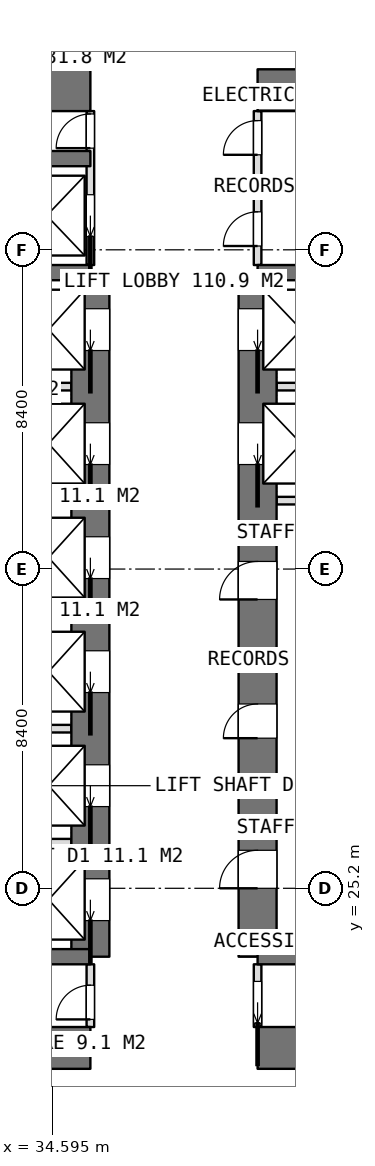
"""IFC4 building model, lengths in metres.
Left out: names, types, materials, properties, quantities, classifications, styles, units other than length and angle.
Written with IfcOpenShell. Run it as: python <this file> out.ifc"""

import sys

from ifc_helpers import new_model, si_unit, direction, frame, frame_2d, origin, place, context, subcontext, project, spatial, rectangle, extrude, element, fill, save


model = new_model("IFC4")
c1 = context("Model", 3, precision=1e-05, world=origin(), true_north=direction((0.0, 1.0)))
c2 = subcontext(c1, "Body", "Model", "MODEL_VIEW")
j1 = project(units=[si_unit("LENGTHUNIT", "METRE"), si_unit("PLANEANGLEUNIT", "RADIAN")], contexts=[c1])
p1 = place(None, origin())
s1 = spatial("IfcSite", under=j1, at=p1, CompositionType="ELEMENT")
p2 = place(p1, origin())
s2 = spatial("IfcBuilding", under=s1, at=p2, CompositionType="ELEMENT")
p3 = place(p2, frame((0.0, 0.0, 245.6)))
s3 = spatial("IfcBuildingStorey", under=s2, at=p3, CompositionType="ELEMENT", Elevation=245.6)
p4 = place(p3, frame((25.2, 21.0, 0.0), z_axis=(0.0, 0.0, 1.0), x_axis=(1.0, 0.0, 0.0)))
e1 = element("IfcWall", 1, at=p4, inside=s3, PredefinedType="SHEAR", context=c2, shape_type="SweptSolid", body=[
    extrude(rectangle(XDim=10.4, YDim=1.1, at=frame_2d((5.2, 0.0))), origin(), (0.0, 0.0, 1.0), 4.5),
])
p5 = place(p3, frame((40.0, 21.0, 0.0), z_axis=(0.0, 0.0, 1.0), x_axis=(1.0, 0.0, 0.0)))
e2 = element("IfcWall", 2, at=p5, inside=s3, PredefinedType="SHEAR", context=c2, shape_type="SweptSolid", body=[
    extrude(rectangle(XDim=10.4, YDim=1.1, at=frame_2d((5.2, 0.0))), origin(), (0.0, 0.0, 1.0), 4.5),
])
p6 = place(p3, frame((25.2, 46.2, 0.0), z_axis=(0.0, 0.0, 1.0), x_axis=(1.0, 0.0, 0.0)))
e3 = element("IfcWall", 3, at=p6, inside=s3, PredefinedType="SHEAR", context=c2, shape_type="SweptSolid", body=[
    extrude(rectangle(XDim=10.4, YDim=1.1, at=frame_2d((5.2, 0.0))), origin(), (0.0, 0.0, 1.0), 4.5),
])
p7 = place(p3, frame((40.0, 46.2, 0.0), z_axis=(0.0, 0.0, 1.0), x_axis=(1.0, 0.0, 0.0)))
e4 = element("IfcWall", 4, at=p7, inside=s3, PredefinedType="SHEAR", context=c2, shape_type="SweptSolid", body=[
    extrude(rectangle(XDim=10.4, YDim=1.1, at=frame_2d((5.2, 0.0))), origin(), (0.0, 0.0, 1.0), 4.5),
])
p8 = place(p3, frame((35.6, 23.4, 0.0), z_axis=(0.0, 0.0, 1.0), x_axis=(0.0, 1.0, 0.0)))
e5 = element("IfcWall", 5, at=p8, inside=s3, PredefinedType="SHEAR", context=c2, shape_type="SweptSolid", body=[
    extrude(rectangle(XDim=18.0, YDim=1.0, at=frame_2d((9.0, 0.0))), origin(), (0.0, 0.0, 1.0), 4.5),
])
p9 = place(p8, frame((0.95, 0.0, 0.0)))
e6 = element("IfcOpeningElement", 6, at=p9, cuts=e5, PredefinedType="OPENING", context=c2, shape_type="SweptSolid", body=[
    extrude(rectangle(XDim=1.1, YDim=2.1, at=frame_2d((0.55, 1.05))), frame((0.0, 0.51, 0.0), z_axis=(0.0, -1.0, 0.0), x_axis=(1.0, 0.0, 0.0)), (0.0, 0.0, 1.0), 1.02),
])
p10 = place(p8, frame((3.95, 0.0, 0.0)))
e7 = element("IfcOpeningElement", 7, at=p10, cuts=e5, PredefinedType="OPENING", context=c2, shape_type="SweptSolid", body=[
    extrude(rectangle(XDim=1.1, YDim=2.1, at=frame_2d((0.55, 1.05))), frame((0.0, 0.51, 0.0), z_axis=(0.0, -1.0, 0.0), x_axis=(1.0, 0.0, 0.0)), (0.0, 0.0, 1.0), 1.02),
])
p11 = place(p8, frame((6.95, 0.0, 0.0)))
e8 = element("IfcOpeningElement", 8, at=p11, cuts=e5, PredefinedType="OPENING", context=c2, shape_type="SweptSolid", body=[
    extrude(rectangle(XDim=1.1, YDim=2.1, at=frame_2d((0.55, 1.05))), frame((0.0, 0.51, 0.0), z_axis=(0.0, -1.0, 0.0), x_axis=(1.0, 0.0, 0.0)), (0.0, 0.0, 1.0), 1.02),
])
p12 = place(p8, frame((9.95, 0.0, 0.0)))
e9 = element("IfcOpeningElement", 9, at=p12, cuts=e5, PredefinedType="OPENING", context=c2, shape_type="SweptSolid", body=[
    extrude(rectangle(XDim=1.1, YDim=2.1, at=frame_2d((0.55, 1.05))), frame((0.0, 0.51, 0.0), z_axis=(0.0, -1.0, 0.0), x_axis=(1.0, 0.0, 0.0)), (0.0, 0.0, 1.0), 1.02),
])
p13 = place(p8, frame((12.95, 0.0, 0.0)))
e10 = element("IfcOpeningElement", 10, at=p13, cuts=e5, PredefinedType="OPENING", context=c2, shape_type="SweptSolid", body=[
    extrude(rectangle(XDim=1.1, YDim=2.1, at=frame_2d((0.55, 1.05))), frame((0.0, 0.51, 0.0), z_axis=(0.0, -1.0, 0.0), x_axis=(1.0, 0.0, 0.0)), (0.0, 0.0, 1.0), 1.02),
])
p14 = place(p8, frame((15.95, 0.0, 0.0)))
e11 = element("IfcOpeningElement", 11, at=p14, cuts=e5, PredefinedType="OPENING", context=c2, shape_type="SweptSolid", body=[
    extrude(rectangle(XDim=1.1, YDim=2.1, at=frame_2d((0.55, 1.05))), frame((0.0, 0.51, 0.0), z_axis=(0.0, -1.0, 0.0), x_axis=(1.0, 0.0, 0.0)), (0.0, 0.0, 1.0), 1.02),
])
p15 = place(p3, frame((40.0, 23.4, 0.0), z_axis=(0.0, 0.0, 1.0), x_axis=(0.0, 1.0, 0.0)))
e12 = element("IfcWall", 12, at=p15, inside=s3, PredefinedType="SHEAR", context=c2, shape_type="SweptSolid", body=[
    extrude(rectangle(XDim=18.0, YDim=1.0, at=frame_2d((9.0, 0.0))), origin(), (0.0, 0.0, 1.0), 4.5),
])
p16 = place(p15, frame((1.8, 0.0, 0.0)))
e13 = element("IfcOpeningElement", 13, at=p16, cuts=e12, PredefinedType="OPENING", context=c2, shape_type="SweptSolid", body=[
    extrude(rectangle(XDim=1.0, YDim=2.1, at=frame_2d((0.5, 1.05))), frame((0.0, 0.51, 0.0), z_axis=(0.0, -1.0, 0.0), x_axis=(1.0, 0.0, 0.0)), (0.0, 0.0, 1.0), 1.02),
])
p17 = place(p15, frame((5.75, 0.0, 0.0)))
e14 = element("IfcOpeningElement", 14, at=p17, cuts=e12, PredefinedType="OPENING", context=c2, shape_type="SweptSolid", body=[
    extrude(rectangle(XDim=0.9, YDim=2.1, at=frame_2d((0.45, 1.05))), frame((0.0, 0.51, 0.0), z_axis=(0.0, -1.0, 0.0), x_axis=(1.0, 0.0, 0.0)), (0.0, 0.0, 1.0), 1.02),
])
p18 = place(p15, frame((9.4, 0.0, 0.0)))
e15 = element("IfcOpeningElement", 15, at=p18, cuts=e12, PredefinedType="OPENING", context=c2, shape_type="SweptSolid", body=[
    extrude(rectangle(XDim=1.0, YDim=2.1, at=frame_2d((0.5, 1.05))), frame((0.0, 0.51, 0.0), z_axis=(0.0, -1.0, 0.0), x_axis=(1.0, 0.0, 0.0)), (0.0, 0.0, 1.0), 1.02),
])
p19 = place(p15, frame((12.95, 0.0, 0.0)))
e16 = element("IfcOpeningElement", 16, at=p19, cuts=e12, PredefinedType="OPENING", context=c2, shape_type="SweptSolid", body=[
    extrude(rectangle(XDim=1.1, YDim=2.1, at=frame_2d((0.55, 1.05))), frame((0.0, 0.51, 0.0), z_axis=(0.0, -1.0, 0.0), x_axis=(1.0, 0.0, 0.0)), (0.0, 0.0, 1.0), 1.02),
])
p20 = place(p15, frame((15.95, 0.0, 0.0)))
e17 = element("IfcOpeningElement", 17, at=p20, cuts=e12, PredefinedType="OPENING", context=c2, shape_type="SweptSolid", body=[
    extrude(rectangle(XDim=1.1, YDim=2.1, at=frame_2d((0.55, 1.05))), frame((0.0, 0.51, 0.0), z_axis=(0.0, -1.0, 0.0), x_axis=(1.0, 0.0, 0.0)), (0.0, 0.0, 1.0), 1.02),
])
for number, where, z_axis, x_axis in (
    (18, (31.8, 23.4, 0.0), (0.0, 0.0, 1.0), (1.0, 0.0, 0.0)),
    (19, (31.8, 41.4, 0.0), (0.0, 0.0, 1.0), (1.0, 0.0, 0.0)),
    (20, (31.8, 44.4, 0.0), (0.0, 0.0, 1.0), (1.0, 0.0, 0.0)),
    (21, (40.0, 23.4, 0.0), (0.0, 0.0, 1.0), (1.0, 0.0, 0.0)),
    (22, (40.0, 41.4, 0.0), (0.0, 0.0, 1.0), (1.0, 0.0, 0.0)),
):
    element("IfcWall", number, at=place(p3, frame(where, z_axis=z_axis, x_axis=x_axis)), inside=s3, PredefinedType="SHEAR", context=c2, shape_type="SweptSolid", body=[
        extrude(rectangle(XDim=3.8, YDim=0.4, at=frame_2d((1.9, 0.0))), origin(), (0.0, 0.0, 1.0), 4.5),
    ])
for number, where, z_axis, x_axis in (
    (23, (32.0, 26.4, 0.0), (0.0, 0.0, 1.0), (1.0, 0.0, 0.0)),
    (24, (32.0, 29.4, 0.0), (0.0, 0.0, 1.0), (1.0, 0.0, 0.0)),
    (25, (32.0, 32.4, 0.0), (0.0, 0.0, 1.0), (1.0, 0.0, 0.0)),
    (26, (32.0, 35.4, 0.0), (0.0, 0.0, 1.0), (1.0, 0.0, 0.0)),
    (27, (32.0, 38.4, 0.0), (0.0, 0.0, 1.0), (1.0, 0.0, 0.0)),
    (28, (40.5, 35.4, 0.0), (0.0, 0.0, 1.0), (1.0, 0.0, 0.0)),
    (29, (40.5, 38.4, 0.0), (0.0, 0.0, 1.0), (1.0, 0.0, 0.0)),
):
    element("IfcWall", number, at=place(p3, frame(where, z_axis=z_axis, x_axis=x_axis)), inside=s3, PredefinedType="PARTITIONING", context=c2, shape_type="SweptSolid", body=[
        extrude(rectangle(XDim=3.1, YDim=0.2, at=frame_2d((1.55, 0.0))), origin(), (0.0, 0.0, 1.0), 4.25),
    ])
p21 = place(p3, frame((40.0, 21.55, 0.0), z_axis=(0.0, 0.0, 1.0), x_axis=(0.0, 1.0, 0.0)))
e30 = element("IfcWall", 30, at=p21, inside=s3, PredefinedType="PARTITIONING", context=c2, shape_type="SweptSolid", body=[
    extrude(rectangle(XDim=1.65, YDim=0.2, at=frame_2d((0.825, 0.0))), origin(), (0.0, 0.0, 1.0), 4.25),
])
p22 = place(p21, frame((0.1, 0.0, 0.0)))
e31 = element("IfcOpeningElement", 31, at=p22, cuts=e30, PredefinedType="OPENING", context=c2, shape_type="SweptSolid", body=[
    extrude(rectangle(XDim=1.1, YDim=2.1, at=frame_2d((0.55, 1.05))), frame((0.0, 0.11, 0.0), z_axis=(0.0, -1.0, 0.0), x_axis=(1.0, 0.0, 0.0)), (0.0, 0.0, 1.0), 0.22),
])
p23 = place(p3, frame((40.0, 41.6, 0.0), z_axis=(0.0, 0.0, 1.0), x_axis=(0.0, 1.0, 0.0)))
e32 = element("IfcWall", 32, at=p23, inside=s3, PredefinedType="PARTITIONING", context=c2, shape_type="SweptSolid", body=[
    extrude(rectangle(XDim=4.05, YDim=0.2, at=frame_2d((2.025, 0.0))), origin(), (0.0, 0.0, 1.0), 4.25),
])
p24 = place(p23, frame((2.9, 0.0, 0.0)))
e33 = element("IfcOpeningElement", 33, at=p24, cuts=e32, PredefinedType="OPENING", context=c2, shape_type="SweptSolid", body=[
    extrude(rectangle(XDim=0.9, YDim=2.1, at=frame_2d((0.45, 1.05))), frame((0.0, 0.11, 0.0), z_axis=(0.0, -1.0, 0.0), x_axis=(1.0, 0.0, 0.0)), (0.0, 0.0, 1.0), 0.22),
])
p25 = place(p23, frame((0.5, 0.0, 0.0)))
e34 = element("IfcOpeningElement", 34, at=p25, cuts=e32, PredefinedType="OPENING", context=c2, shape_type="SweptSolid", body=[
    extrude(rectangle(XDim=0.9, YDim=2.1, at=frame_2d((0.45, 1.05))), frame((0.0, 0.11, 0.0), z_axis=(0.0, -1.0, 0.0), x_axis=(1.0, 0.0, 0.0)), (0.0, 0.0, 1.0), 0.22),
])
p26 = place(p3, frame((35.6, 41.6, 0.0), z_axis=(0.0, 0.0, 1.0), x_axis=(0.0, 1.0, 0.0)))
e35 = element("IfcWall", 35, at=p26, inside=s3, PredefinedType="PARTITIONING", context=c2, shape_type="SweptSolid", body=[
    extrude(rectangle(XDim=4.05, YDim=0.2, at=frame_2d((2.025, 0.0))), origin(), (0.0, 0.0, 1.0), 4.25),
])
p27 = place(p26, frame((3.075, 0.0, 0.0)))
e36 = element("IfcOpeningElement", 36, at=p27, cuts=e35, PredefinedType="OPENING", context=c2, shape_type="SweptSolid", body=[
    extrude(rectangle(XDim=0.9, YDim=2.1, at=frame_2d((0.45, 1.05))), frame((0.0, 0.11, 0.0), z_axis=(0.0, -1.0, 0.0), x_axis=(1.0, 0.0, 0.0)), (0.0, 0.0, 1.0), 0.22),
])
p28 = place(p26, frame((0.75, 0.0, 0.0)))
e37 = element("IfcOpeningElement", 37, at=p28, cuts=e35, PredefinedType="OPENING", context=c2, shape_type="SweptSolid", body=[
    extrude(rectangle(XDim=1.1, YDim=2.1, at=frame_2d((0.55, 1.05))), frame((0.0, 0.11, 0.0), z_axis=(0.0, -1.0, 0.0), x_axis=(1.0, 0.0, 0.0)), (0.0, 0.0, 1.0), 0.22),
])
p29 = place(p3, frame((35.6, 21.55, 0.0), z_axis=(0.0, 0.0, 1.0), x_axis=(0.0, 1.0, 0.0)))
e38 = element("IfcWall", 38, at=p29, inside=s3, PredefinedType="PARTITIONING", context=c2, shape_type="SweptSolid", body=[
    extrude(rectangle(XDim=1.65, YDim=0.2, at=frame_2d((0.825, 0.0))), origin(), (0.0, 0.0, 1.0), 4.25),
])
p30 = place(p29, frame((0.2, 0.0, 0.0)))
e39 = element("IfcOpeningElement", 39, at=p30, cuts=e38, PredefinedType="OPENING", context=c2, shape_type="SweptSolid", body=[
    extrude(rectangle(XDim=0.9, YDim=2.1, at=frame_2d((0.45, 1.05))), frame((0.0, 0.11, 0.0), z_axis=(0.0, -1.0, 0.0), x_axis=(1.0, 0.0, 0.0)), (0.0, 0.0, 1.0), 0.22),
])
for number, where, z_axis, x_axis in (
    (40, (40.5, 28.0, 0.0), (0.0, 0.0, 1.0), (1.0, 0.0, 0.0)),
    (41, (40.5, 31.2, 0.0), (0.0, 0.0, 1.0), (1.0, 0.0, 0.0)),
):
    element("IfcWall", number, at=place(p3, frame(where, z_axis=z_axis, x_axis=x_axis)), inside=s3, PredefinedType="PARTITIONING", context=c2, shape_type="SweptSolid", body=[
        extrude(rectangle(XDim=3.1, YDim=0.2, at=frame_2d((1.55, 0.0))), origin(), (0.0, 0.0, 1.0), 4.25),
    ])
p31 = place(p3, frame((40.0, 43.7, 0.0), z_axis=(0.0, 0.0, 1.0), x_axis=(1.0, 0.0, 0.0)))
e42 = element("IfcWall", 42, at=p31, inside=s3, PredefinedType="PARTITIONING", context=c2, shape_type="SweptSolid", body=[
    extrude(rectangle(XDim=3.6, YDim=0.2, at=frame_2d((1.8, 0.0))), origin(), (0.0, 0.0, 1.0), 4.25),
])
p32 = place(p22, origin())
e43 = element("IfcDoor", 43, at=p32, inside=s3, OperationType="SLIDING_TO_LEFT", PredefinedType="DOOR", context=c2, shape_type="SweptSolid", body=[
    extrude(rectangle(XDim=1.1, YDim=2.1, at=frame_2d((0.55, 1.05))), frame((0.0, 0.025, 0.0), z_axis=(0.0, -1.0, 0.0), x_axis=(1.0, 0.0, 0.0)), (0.0, 0.0, 1.0), 0.05),
])
fill(e31, e43)
p33 = place(p30, origin())
e44 = element("IfcDoor", 44, at=p33, inside=s3, OperationType="SINGLE_SWING_LEFT", PredefinedType="DOOR", context=c2, shape_type="SweptSolid", body=[
    extrude(rectangle(XDim=0.9, YDim=2.1, at=frame_2d((0.45, 1.05))), frame((0.0, 0.025, 0.0), z_axis=(0.0, -1.0, 0.0), x_axis=(1.0, 0.0, 0.0)), (0.0, 0.0, 1.0), 0.05),
])
fill(e39, e44)
p34 = place(p24, origin())
e45 = element("IfcDoor", 45, at=p34, inside=s3, OperationType="SINGLE_SWING_LEFT", PredefinedType="DOOR", context=c2, shape_type="SweptSolid", body=[
    extrude(rectangle(XDim=0.9, YDim=2.1, at=frame_2d((0.45, 1.05))), frame((0.0, 0.025, 0.0), z_axis=(0.0, -1.0, 0.0), x_axis=(1.0, 0.0, 0.0)), (0.0, 0.0, 1.0), 0.05),
])
fill(e33, e45)
p35 = place(p25, origin())
e46 = element("IfcDoor", 46, at=p35, inside=s3, OperationType="SINGLE_SWING_LEFT", PredefinedType="DOOR", context=c2, shape_type="SweptSolid", body=[
    extrude(rectangle(XDim=0.9, YDim=2.1, at=frame_2d((0.45, 1.05))), frame((0.0, 0.025, 0.0), z_axis=(0.0, -1.0, 0.0), x_axis=(1.0, 0.0, 0.0)), (0.0, 0.0, 1.0), 0.05),
])
fill(e34, e46)
p36 = place(p16, origin())
e47 = element("IfcDoor", 47, at=p36, inside=s3, OperationType="SINGLE_SWING_LEFT", PredefinedType="DOOR", context=c2, shape_type="SweptSolid", body=[
    extrude(rectangle(XDim=1.0, YDim=2.1, at=frame_2d((0.5, 1.05))), frame((0.0, 0.025, 0.0), z_axis=(0.0, -1.0, 0.0), x_axis=(1.0, 0.0, 0.0)), (0.0, 0.0, 1.0), 0.05),
])
fill(e13, e47)
p37 = place(p17, origin())
e48 = element("IfcDoor", 48, at=p37, inside=s3, OperationType="SINGLE_SWING_LEFT", PredefinedType="DOOR", context=c2, shape_type="SweptSolid", body=[
    extrude(rectangle(XDim=0.9, YDim=2.1, at=frame_2d((0.45, 1.05))), frame((0.0, 0.025, 0.0), z_axis=(0.0, -1.0, 0.0), x_axis=(1.0, 0.0, 0.0)), (0.0, 0.0, 1.0), 0.05),
])
fill(e14, e48)
p38 = place(p18, origin())
e49 = element("IfcDoor", 49, at=p38, inside=s3, OperationType="SINGLE_SWING_LEFT", PredefinedType="DOOR", context=c2, shape_type="SweptSolid", body=[
    extrude(rectangle(XDim=1.0, YDim=2.1, at=frame_2d((0.5, 1.05))), frame((0.0, 0.025, 0.0), z_axis=(0.0, -1.0, 0.0), x_axis=(1.0, 0.0, 0.0)), (0.0, 0.0, 1.0), 0.05),
])
fill(e15, e49)
p39 = place(p27, origin())
e50 = element("IfcDoor", 50, at=p39, inside=s3, OperationType="SINGLE_SWING_LEFT", PredefinedType="DOOR", context=c2, shape_type="SweptSolid", body=[
    extrude(rectangle(XDim=0.9, YDim=2.1, at=frame_2d((0.45, 1.05))), frame((0.0, 0.025, 0.0), z_axis=(0.0, -1.0, 0.0), x_axis=(1.0, 0.0, 0.0)), (0.0, 0.0, 1.0), 0.05),
])
fill(e36, e50)
p40 = place(p9, origin())
e51 = element("IfcDoor", 51, at=p40, inside=s3, OperationType="SLIDING_TO_LEFT", PredefinedType="USERDEFINED", context=c2, shape_type="SweptSolid", body=[
    extrude(rectangle(XDim=1.1, YDim=2.1, at=frame_2d((0.55, 1.05))), frame((0.0, 0.025, 0.0), z_axis=(0.0, -1.0, 0.0), x_axis=(1.0, 0.0, 0.0)), (0.0, 0.0, 1.0), 0.05),
])
fill(e6, e51)
p41 = place(p10, origin())
e52 = element("IfcDoor", 52, at=p41, inside=s3, OperationType="SLIDING_TO_LEFT", PredefinedType="USERDEFINED", context=c2, shape_type="SweptSolid", body=[
    extrude(rectangle(XDim=1.1, YDim=2.1, at=frame_2d((0.55, 1.05))), frame((0.0, 0.025, 0.0), z_axis=(0.0, -1.0, 0.0), x_axis=(1.0, 0.0, 0.0)), (0.0, 0.0, 1.0), 0.05),
])
fill(e7, e52)
p42 = place(p11, origin())
e53 = element("IfcDoor", 53, at=p42, inside=s3, OperationType="SLIDING_TO_LEFT", PredefinedType="USERDEFINED", context=c2, shape_type="SweptSolid", body=[
    extrude(rectangle(XDim=1.1, YDim=2.1, at=frame_2d((0.55, 1.05))), frame((0.0, 0.025, 0.0), z_axis=(0.0, -1.0, 0.0), x_axis=(1.0, 0.0, 0.0)), (0.0, 0.0, 1.0), 0.05),
])
fill(e8, e53)
p43 = place(p12, origin())
e54 = element("IfcDoor", 54, at=p43, inside=s3, OperationType="SLIDING_TO_LEFT", PredefinedType="USERDEFINED", context=c2, shape_type="SweptSolid", body=[
    extrude(rectangle(XDim=1.1, YDim=2.1, at=frame_2d((0.55, 1.05))), frame((0.0, 0.025, 0.0), z_axis=(0.0, -1.0, 0.0), x_axis=(1.0, 0.0, 0.0)), (0.0, 0.0, 1.0), 0.05),
])
fill(e9, e54)
p44 = place(p13, origin())
e55 = element("IfcDoor", 55, at=p44, inside=s3, OperationType="SLIDING_TO_LEFT", PredefinedType="USERDEFINED", context=c2, shape_type="SweptSolid", body=[
    extrude(rectangle(XDim=1.1, YDim=2.1, at=frame_2d((0.55, 1.05))), frame((0.0, 0.025, 0.0), z_axis=(0.0, -1.0, 0.0), x_axis=(1.0, 0.0, 0.0)), (0.0, 0.0, 1.0), 0.05),
])
fill(e10, e55)
p45 = place(p14, origin())
e56 = element("IfcDoor", 56, at=p45, inside=s3, OperationType="SLIDING_TO_LEFT", PredefinedType="USERDEFINED", context=c2, shape_type="SweptSolid", body=[
    extrude(rectangle(XDim=1.1, YDim=2.1, at=frame_2d((0.55, 1.05))), frame((0.0, 0.025, 0.0), z_axis=(0.0, -1.0, 0.0), x_axis=(1.0, 0.0, 0.0)), (0.0, 0.0, 1.0), 0.05),
])
fill(e11, e56)
p46 = place(p19, origin())
e57 = element("IfcDoor", 57, at=p46, inside=s3, OperationType="SLIDING_TO_LEFT", PredefinedType="USERDEFINED", context=c2, shape_type="SweptSolid", body=[
    extrude(rectangle(XDim=1.1, YDim=2.1, at=frame_2d((0.55, 1.05))), frame((0.0, 0.025, 0.0), z_axis=(0.0, -1.0, 0.0), x_axis=(1.0, 0.0, 0.0)), (0.0, 0.0, 1.0), 0.05),
])
fill(e16, e57)
p47 = place(p20, origin())
e58 = element("IfcDoor", 58, at=p47, inside=s3, OperationType="SLIDING_TO_LEFT", PredefinedType="USERDEFINED", context=c2, shape_type="SweptSolid", body=[
    extrude(rectangle(XDim=1.1, YDim=2.1, at=frame_2d((0.55, 1.05))), frame((0.0, 0.025, 0.0), z_axis=(0.0, -1.0, 0.0), x_axis=(1.0, 0.0, 0.0)), (0.0, 0.0, 1.0), 0.05),
])
fill(e17, e58)
p48 = place(p28, origin())
e59 = element("IfcDoor", 59, at=p48, inside=s3, OperationType="SLIDING_TO_LEFT", PredefinedType="USERDEFINED", context=c2, shape_type="SweptSolid", body=[
    extrude(rectangle(XDim=1.1, YDim=2.1, at=frame_2d((0.55, 1.05))), frame((0.0, 0.025, 0.0), z_axis=(0.0, -1.0, 0.0), x_axis=(1.0, 0.0, 0.0)), (0.0, 0.0, 1.0), 0.05),
])
fill(e37, e59)
save(model, sys.argv[1])
